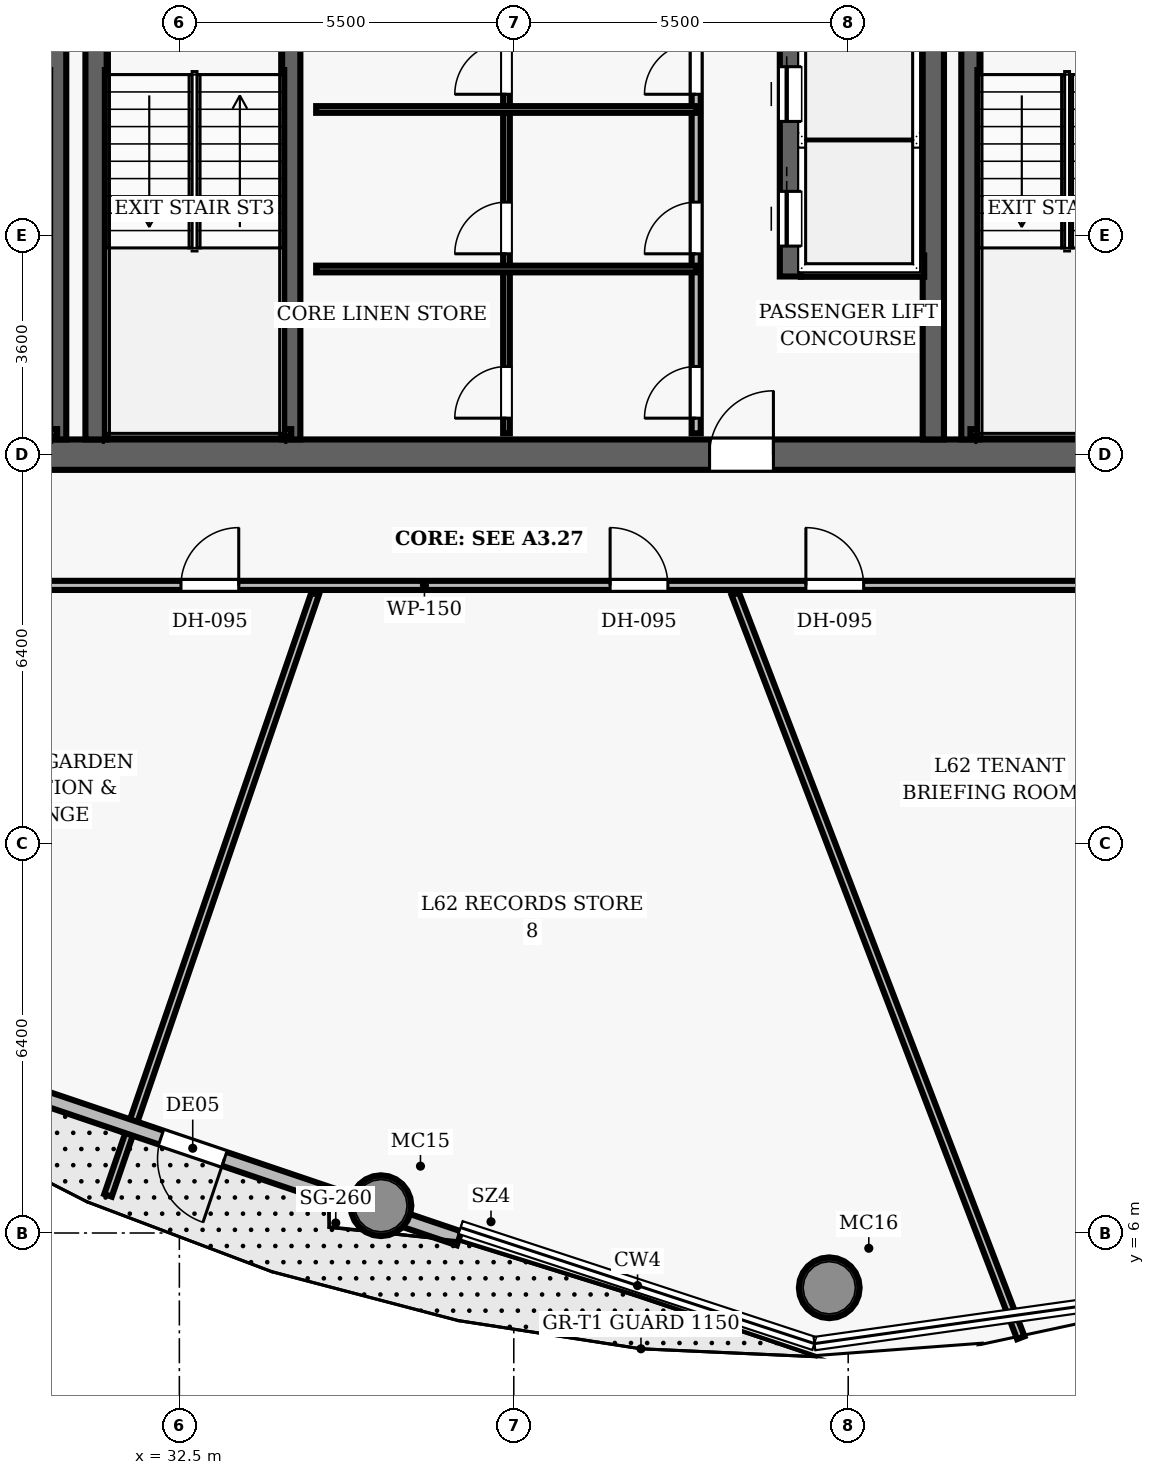
"""IFC4 building model, lengths in metres.
Left out: names, types, materials, properties, quantities, classifications, styles, units other than length and angle.
Written with IfcOpenShell. Run it as: python <this file> out.ifc"""

import sys

from ifc_helpers import new_model, si_unit, direction, frame, frame_2d, origin, origin_2d, place, context, subcontext, project, spatial, rectangle, hollow_circle, extrude, element, fill, save


model = new_model("IFC4")
c1 = context("Model", 3, precision=1e-05, world=origin(), true_north=direction((0.0, 1.0)))
c2 = subcontext(c1, "Body", "Model", "MODEL_VIEW")
j1 = project(units=[si_unit("LENGTHUNIT", "METRE"), si_unit("PLANEANGLEUNIT", "RADIAN")], contexts=[c1])
p1 = place(None, origin())
s1 = spatial("IfcSite", under=j1, at=p1, CompositionType="ELEMENT")
p2 = place(p1, origin())
s2 = spatial("IfcBuilding", under=s1, at=p2, CompositionType="ELEMENT")
p3 = place(p2, frame((0.0, 0.0, 245.9)))
s3 = spatial("IfcBuildingStorey", under=s2, at=p3, CompositionType="ELEMENT", Elevation=245.9)
p4 = place(p3, frame((26.75, 18.8, 0.0), z_axis=(0.0, 0.0, 1.0), x_axis=(1.0, 0.0, 0.0)))
e1 = element("IfcWall", 1, at=p4, inside=s3, PredefinedType="SHEAR", context=c2, shape_type="SweptSolid", body=[
    extrude(rectangle(XDim=22.5, YDim=0.5, at=frame_2d((11.25, 0.0))), origin(), (0.0, 0.0, 1.0), 3.85),
])
p5 = place(p4, frame((14.47, 0.0, 0.0)))
e2 = element("IfcOpeningElement", 2, at=p5, cuts=e1, PredefinedType="OPENING", context=c2, shape_type="SweptSolid", body=[
    extrude(rectangle(XDim=1.05, YDim=2.15, at=frame_2d((0.525, 1.075))), frame((0.0, 0.26, 0.0), z_axis=(0.0, -1.0, 0.0), x_axis=(1.0, 0.0, 0.0)), (0.0, 0.0, 1.0), 0.52),
])
for number, where, z_axis, x_axis in (
    (3, (31.13, 19.05, 0.0), (0.0, 0.0, 1.0), (0.0, 1.0, 0.0)),
    (4, (44.9, 19.05, 0.0), (0.0, 0.0, 1.0), (0.0, 1.0, 0.0)),
):
    element("IfcWall", number, at=place(p3, frame(where, z_axis=z_axis, x_axis=x_axis)), inside=s3, PredefinedType="SHEAR", context=c2, shape_type="SweptSolid", body=[
        extrude(rectangle(XDim=13.9, YDim=0.35, at=frame_2d((6.95, 0.0))), origin(), (0.0, 0.0, 1.0), 3.85),
    ])
for number, where, z_axis, x_axis in (
    (5, (35.815, 6.449, 0.0), (0.0, 0.0, 1.0), (1.0, 0.0, 0.0)),
    (6, (43.188, 5.099, 0.0), (0.0, 0.0, 1.0), (1.0, 0.0, 0.0)),
):
    element("IfcColumn", number, at=place(p3, frame(where, z_axis=z_axis, x_axis=x_axis)), inside=s3, PredefinedType="COLUMN", context=c2, shape_type="SweptSolid", body=[
        extrude(hollow_circle(Radius=0.5, WallThickness=0.045, at=origin_2d()), origin(), (0.0, 0.0, 1.0), 3.85),
    ])
p6 = place(p3, frame((30.49, 19.05, 0.0), z_axis=(0.0, 0.0, 1.0), x_axis=(0.0, 1.0, 0.0)))
e7 = element("IfcWall", 7, at=p6, inside=s3, PredefinedType="SHEAR", context=c2, shape_type="SweptSolid", body=[
    extrude(rectangle(XDim=7.5, YDim=0.3, at=frame_2d((3.75, 0.0))), origin(), (0.0, 0.0, 1.0), 3.85),
])
p7 = place(p3, frame((27.395, 19.16, 0.0), z_axis=(0.0, 0.0, 1.0), x_axis=(1.0, 0.0, 0.0)))
e8 = element("IfcWall", 8, at=p7, inside=s3, PredefinedType="SHEAR", context=c2, shape_type="SweptSolid", body=[
    extrude(rectangle(XDim=3.095, YDim=0.12, at=frame_2d((1.547, 0.0))), origin(), (0.0, 0.0, 1.0), 3.85),
])
p8 = place(p3, frame((45.51, 19.05, 0.0), z_axis=(0.0, 0.0, 1.0), x_axis=(0.0, 1.0, 0.0)))
e9 = element("IfcWall", 9, at=p8, inside=s3, PredefinedType="SHEAR", context=c2, shape_type="SweptSolid", body=[
    extrude(rectangle(XDim=7.5, YDim=0.3, at=frame_2d((3.75, 0.0))), origin(), (0.0, 0.0, 1.0), 3.85),
])
p9 = place(p3, frame((45.51, 19.16, 0.0), z_axis=(0.0, 0.0, 1.0), x_axis=(1.0, 0.0, 0.0)))
e10 = element("IfcWall", 10, at=p9, inside=s3, PredefinedType="SHEAR", context=c2, shape_type="SweptSolid", body=[
    extrude(rectangle(XDim=3.095, YDim=0.12, at=frame_2d((1.547, 0.0))), origin(), (0.0, 0.0, 1.0), 3.85),
])
p10 = place(p3, frame((34.34, 19.05, 0.0), z_axis=(0.0, 0.0, 1.0), x_axis=(0.0, 1.0, 0.0)))
e11 = element("IfcWall", 11, at=p10, inside=s3, PredefinedType="SHEAR", context=c2, shape_type="SweptSolid", body=[
    extrude(rectangle(XDim=7.5, YDim=0.3, at=frame_2d((3.75, 0.0))), origin(), (0.0, 0.0, 1.0), 3.85),
])
p11 = place(p3, frame((31.3, 19.16, 0.0), z_axis=(0.0, 0.0, 1.0), x_axis=(1.0, 0.0, 0.0)))
e12 = element("IfcWall", 12, at=p11, inside=s3, PredefinedType="SHEAR", context=c2, shape_type="SweptSolid", body=[
    extrude(rectangle(XDim=3.04, YDim=0.12, at=frame_2d((1.52, 0.0))), origin(), (0.0, 0.0, 1.0), 3.85),
])
p12 = place(p3, frame((42.55, 21.73, 0.0), z_axis=(0.0, 0.0, 1.0), x_axis=(0.0, 1.0, 0.0)))
e13 = element("IfcWall", 13, at=p12, inside=s3, PredefinedType="SHEAR", context=c2, shape_type="SweptSolid", body=[
    extrude(rectangle(XDim=6.54, YDim=0.35, at=frame_2d((3.27, 0.0))), origin(), (0.0, 0.0, 1.0), 3.04),
])
p13 = place(p12, frame((0.5, 0.0, 0.0)))
e14 = element("IfcOpeningElement", 14, at=p13, cuts=e13, PredefinedType="OPENING", context=c2, shape_type="SweptSolid", body=[
    extrude(rectangle(XDim=0.9, YDim=2.15, at=frame_2d((0.45, 1.075))), frame((0.0, 0.185, 0.0), z_axis=(0.0, -1.0, 0.0), x_axis=(1.0, 0.0, 0.0)), (0.0, 0.0, 1.0), 0.37),
])
p14 = place(p12, frame((2.55, 0.0, 0.0)))
e15 = element("IfcOpeningElement", 15, at=p14, cuts=e13, PredefinedType="OPENING", context=c2, shape_type="SweptSolid", body=[
    extrude(rectangle(XDim=0.9, YDim=2.15, at=frame_2d((0.45, 1.075))), frame((0.0, 0.185, 0.0), z_axis=(0.0, -1.0, 0.0), x_axis=(1.0, 0.0, 0.0)), (0.0, 0.0, 1.0), 0.37),
])
p15 = place(p12, frame((4.6, 0.0, 0.0)))
e16 = element("IfcOpeningElement", 16, at=p15, cuts=e13, PredefinedType="OPENING", context=c2, shape_type="SweptSolid", body=[
    extrude(rectangle(XDim=0.9, YDim=2.15, at=frame_2d((0.45, 1.075))), frame((0.0, 0.185, 0.0), z_axis=(0.0, -1.0, 0.0), x_axis=(1.0, 0.0, 0.0)), (0.0, 0.0, 1.0), 0.37),
])
p16 = place(p3, frame((42.72, 21.9, 0.0), z_axis=(0.0, 0.0, 1.0), x_axis=(1.0, 0.0, 0.0)))
e17 = element("IfcWall", 17, at=p16, inside=s3, PredefinedType="SHEAR", context=c2, shape_type="SweptSolid", body=[
    extrude(rectangle(XDim=2.03, YDim=0.35, at=frame_2d((1.015, 0.0))), origin(), (0.0, 0.0, 1.0), 3.04),
])
p17 = place(p3, frame((41.0, 19.15, 0.0), z_axis=(0.0, 0.0, 1.0), x_axis=(0.0, 1.0, 0.0)))
e18 = element("IfcWall", 18, at=p17, inside=s3, PredefinedType="PARTITIONING", context=c2, shape_type="SweptSolid", body=[
    extrude(rectangle(XDim=7.95, YDim=0.15, at=frame_2d((3.975, 0.0))), origin(), (0.0, 0.0, 1.0), 3.04),
])
p18 = place(p17, frame((0.25, 0.0, 0.0)))
e19 = element("IfcOpeningElement", 19, at=p18, cuts=e18, PredefinedType="OPENING", context=c2, shape_type="SweptSolid", body=[
    extrude(rectangle(XDim=0.85, YDim=2.1, at=frame_2d((0.425, 1.05))), frame((0.0, 0.085, 0.0), z_axis=(0.0, -1.0, 0.0), x_axis=(1.0, 0.0, 0.0)), (0.0, 0.0, 1.0), 0.17),
])
p19 = place(p17, frame((2.953, 0.0, 0.0)))
e20 = element("IfcOpeningElement", 20, at=p19, cuts=e18, PredefinedType="OPENING", context=c2, shape_type="SweptSolid", body=[
    extrude(rectangle(XDim=0.85, YDim=2.1, at=frame_2d((0.425, 1.05))), frame((0.0, 0.085, 0.0), z_axis=(0.0, -1.0, 0.0), x_axis=(1.0, 0.0, 0.0)), (0.0, 0.0, 1.0), 0.17),
])
p20 = place(p17, frame((5.576, 0.0, 0.0)))
e21 = element("IfcOpeningElement", 21, at=p20, cuts=e18, PredefinedType="OPENING", context=c2, shape_type="SweptSolid", body=[
    extrude(rectangle(XDim=0.85, YDim=2.1, at=frame_2d((0.425, 1.05))), frame((0.0, 0.085, 0.0), z_axis=(0.0, -1.0, 0.0), x_axis=(1.0, 0.0, 0.0)), (0.0, 0.0, 1.0), 0.17),
])
p21 = place(p3, frame((37.88, 19.15, 0.0), z_axis=(0.0, 0.0, 1.0), x_axis=(0.0, 1.0, 0.0)))
e22 = element("IfcWall", 22, at=p21, inside=s3, PredefinedType="PARTITIONING", context=c2, shape_type="SweptSolid", body=[
    extrude(rectangle(XDim=7.95, YDim=0.11, at=frame_2d((3.975, 0.0))), origin(), (0.0, 0.0, 1.0), 3.04),
])
p22 = place(p21, frame((0.25, 0.0, 0.0)))
e23 = element("IfcOpeningElement", 23, at=p22, cuts=e22, PredefinedType="OPENING", context=c2, shape_type="SweptSolid", body=[
    extrude(rectangle(XDim=0.85, YDim=2.1, at=frame_2d((0.425, 1.05))), frame((0.0, 0.065, 0.0), z_axis=(0.0, -1.0, 0.0), x_axis=(1.0, 0.0, 0.0)), (0.0, 0.0, 1.0), 0.13),
])
p23 = place(p21, frame((2.953, 0.0, 0.0)))
e24 = element("IfcOpeningElement", 24, at=p23, cuts=e22, PredefinedType="OPENING", context=c2, shape_type="SweptSolid", body=[
    extrude(rectangle(XDim=0.85, YDim=2.1, at=frame_2d((0.425, 1.05))), frame((0.0, 0.065, 0.0), z_axis=(0.0, -1.0, 0.0), x_axis=(1.0, 0.0, 0.0)), (0.0, 0.0, 1.0), 0.13),
])
p24 = place(p21, frame((5.576, 0.0, 0.0)))
e25 = element("IfcOpeningElement", 25, at=p24, cuts=e22, PredefinedType="OPENING", context=c2, shape_type="SweptSolid", body=[
    extrude(rectangle(XDim=0.85, YDim=2.1, at=frame_2d((0.425, 1.05))), frame((0.0, 0.065, 0.0), z_axis=(0.0, -1.0, 0.0), x_axis=(1.0, 0.0, 0.0)), (0.0, 0.0, 1.0), 0.13),
])
for number, where, z_axis, x_axis in (
    (26, (34.75, 21.853, 0.0), (0.0, 0.0, 1.0), (1.0, 0.0, 0.0)),
    (27, (34.75, 24.477, 0.0), (0.0, 0.0, 1.0), (1.0, 0.0, 0.0)),
):
    element("IfcWall", number, at=place(p3, frame(where, z_axis=z_axis, x_axis=x_axis)), inside=s3, PredefinedType="PARTITIONING", context=c2, shape_type="SweptSolid", body=[
        extrude(rectangle(XDim=6.25, YDim=0.11, at=frame_2d((3.125, 0.0))), origin(), (0.0, 0.0, 1.0), 3.04),
    ])
p25 = place(p3, frame((26.9, 16.65, 0.0), z_axis=(0.0, 0.0, 1.0), x_axis=(1.0, 0.0, 0.0)))
e28 = element("IfcWall", 28, at=p25, inside=s3, PredefinedType="PARTITIONING", context=c2, shape_type="SweptSolid", body=[
    extrude(rectangle(XDim=22.2, YDim=0.15, at=frame_2d((11.1, 0.0))), origin(), (0.0, 0.0, 1.0), 3.04),
])
p26 = place(p25, frame((5.627, 0.0, 0.0)))
e29 = element("IfcOpeningElement", 29, at=p26, cuts=e28, PredefinedType="OPENING", context=c2, shape_type="SweptSolid", body=[
    extrude(rectangle(XDim=0.95, YDim=2.15, at=frame_2d((0.475, 1.075))), frame((0.0, 0.085, 0.0), z_axis=(0.0, -1.0, 0.0), x_axis=(1.0, 0.0, 0.0)), (0.0, 0.0, 1.0), 0.17),
])
p27 = place(p25, frame((12.684, 0.0, 0.0)))
e30 = element("IfcOpeningElement", 30, at=p27, cuts=e28, PredefinedType="OPENING", context=c2, shape_type="SweptSolid", body=[
    extrude(rectangle(XDim=0.95, YDim=2.15, at=frame_2d((0.475, 1.075))), frame((0.0, 0.085, 0.0), z_axis=(0.0, -1.0, 0.0), x_axis=(1.0, 0.0, 0.0)), (0.0, 0.0, 1.0), 0.17),
])
p28 = place(p25, frame((15.904, 0.0, 0.0)))
e31 = element("IfcOpeningElement", 31, at=p28, cuts=e28, PredefinedType="OPENING", context=c2, shape_type="SweptSolid", body=[
    extrude(rectangle(XDim=0.95, YDim=2.15, at=frame_2d((0.475, 1.075))), frame((0.0, 0.085, 0.0), z_axis=(0.0, -1.0, 0.0), x_axis=(1.0, 0.0, 0.0)), (0.0, 0.0, 1.0), 0.17),
])
p29 = place(p3, frame((34.732, 16.51, 0.0), z_axis=(0.0, 0.0, 1.0), x_axis=(-0.325579978914, -0.945514504029, 0.0)))
e32 = element("IfcWall", 32, at=p29, inside=s3, PredefinedType="PARTITIONING", context=c2, shape_type="SweptSolid", body=[
    extrude(rectangle(XDim=10.461, YDim=0.13, at=frame_2d((5.231, 0.0))), origin(), (0.0, 0.0, 1.0), 3.04),
])
p30 = place(p3, frame((41.643, 16.51, 0.0), z_axis=(0.0, 0.0, 1.0), x_axis=(0.35837217609, -0.933578804068, 0.0)))
e33 = element("IfcWall", 33, at=p30, inside=s3, PredefinedType="PARTITIONING", context=c2, shape_type="SweptSolid", body=[
    extrude(rectangle(XDim=13.103, YDim=0.13, at=frame_2d((6.551, 0.0))), origin(), (0.0, 0.0, 1.0), 3.04),
])
p31 = place(p3, frame((37.101, 5.911, 0.0), z_axis=(0.0, 0.0, 1.0), x_axis=(-0.947242597845, 0.320517489115, 0.0)))
e34 = element("IfcWall", 34, at=p31, inside=s3, PredefinedType="SOLIDWALL", context=c2, shape_type="SweptSolid", body=[
    extrude(rectangle(XDim=12.42, YDim=0.24, at=frame_2d((6.21, 0.0))), origin(), (0.0, 0.0, 1.0), 2.8),
])
p32 = place(p31, frame((4.075, 0.0, 0.0)))
e35 = element("IfcOpeningElement", 35, at=p32, cuts=e34, PredefinedType="OPENING", context=c2, shape_type="SweptSolid", body=[
    extrude(rectangle(XDim=1.1, YDim=2.2, at=frame_2d((0.55, 1.1))), frame((0.0, 0.13, 0.0), z_axis=(0.0, -1.0, 0.0), x_axis=(1.0, 0.0, 0.0)), (0.0, 0.0, 1.0), 0.26),
])
p33 = place(p5, origin())
e36 = element("IfcDoor", 36, at=p33, inside=s3, OperationType="SINGLE_SWING_RIGHT", PredefinedType="DOOR", context=c2, shape_type="SweptSolid", body=[
    extrude(rectangle(XDim=1.05, YDim=2.15, at=frame_2d((0.525, 1.075))), frame((0.0, 0.025, 0.0), z_axis=(0.0, -1.0, 0.0), x_axis=(1.0, 0.0, 0.0)), (0.0, 0.0, 1.0), 0.05),
])
fill(e2, e36)
p34 = place(p18, origin())
e37 = element("IfcDoor", 37, at=p34, inside=s3, OperationType="SINGLE_SWING_LEFT", PredefinedType="DOOR", context=c2, shape_type="SweptSolid", body=[
    extrude(rectangle(XDim=0.85, YDim=2.1, at=frame_2d((0.425, 1.05))), frame((0.0, 0.025, 0.0), z_axis=(0.0, -1.0, 0.0), x_axis=(1.0, 0.0, 0.0)), (0.0, 0.0, 1.0), 0.05),
])
fill(e19, e37)
p35 = place(p22, origin())
e38 = element("IfcDoor", 38, at=p35, inside=s3, OperationType="SINGLE_SWING_LEFT", PredefinedType="DOOR", context=c2, shape_type="SweptSolid", body=[
    extrude(rectangle(XDim=0.85, YDim=2.1, at=frame_2d((0.425, 1.05))), frame((0.0, 0.025, 0.0), z_axis=(0.0, -1.0, 0.0), x_axis=(1.0, 0.0, 0.0)), (0.0, 0.0, 1.0), 0.05),
])
fill(e23, e38)
p36 = place(p19, origin())
e39 = element("IfcDoor", 39, at=p36, inside=s3, OperationType="SINGLE_SWING_LEFT", PredefinedType="DOOR", context=c2, shape_type="SweptSolid", body=[
    extrude(rectangle(XDim=0.85, YDim=2.1, at=frame_2d((0.425, 1.05))), frame((0.0, 0.025, 0.0), z_axis=(0.0, -1.0, 0.0), x_axis=(1.0, 0.0, 0.0)), (0.0, 0.0, 1.0), 0.05),
])
fill(e20, e39)
p37 = place(p23, origin())
e40 = element("IfcDoor", 40, at=p37, inside=s3, OperationType="SINGLE_SWING_LEFT", PredefinedType="DOOR", context=c2, shape_type="SweptSolid", body=[
    extrude(rectangle(XDim=0.85, YDim=2.1, at=frame_2d((0.425, 1.05))), frame((0.0, 0.025, 0.0), z_axis=(0.0, -1.0, 0.0), x_axis=(1.0, 0.0, 0.0)), (0.0, 0.0, 1.0), 0.05),
])
fill(e24, e40)
p38 = place(p20, origin())
e41 = element("IfcDoor", 41, at=p38, inside=s3, OperationType="SINGLE_SWING_LEFT", PredefinedType="DOOR", context=c2, shape_type="SweptSolid", body=[
    extrude(rectangle(XDim=0.85, YDim=2.1, at=frame_2d((0.425, 1.05))), frame((0.0, 0.025, 0.0), z_axis=(0.0, -1.0, 0.0), x_axis=(1.0, 0.0, 0.0)), (0.0, 0.0, 1.0), 0.05),
])
fill(e21, e41)
p39 = place(p24, origin())
e42 = element("IfcDoor", 42, at=p39, inside=s3, OperationType="SINGLE_SWING_LEFT", PredefinedType="DOOR", context=c2, shape_type="SweptSolid", body=[
    extrude(rectangle(XDim=0.85, YDim=2.1, at=frame_2d((0.425, 1.05))), frame((0.0, 0.025, 0.0), z_axis=(0.0, -1.0, 0.0), x_axis=(1.0, 0.0, 0.0)), (0.0, 0.0, 1.0), 0.05),
])
fill(e25, e42)
p40 = place(p26, origin())
e43 = element("IfcDoor", 43, at=p40, inside=s3, OperationType="SINGLE_SWING_RIGHT", PredefinedType="DOOR", context=c2, shape_type="SweptSolid", body=[
    extrude(rectangle(XDim=0.95, YDim=2.15, at=frame_2d((0.475, 1.075))), frame((0.0, 0.025, 0.0), z_axis=(0.0, -1.0, 0.0), x_axis=(1.0, 0.0, 0.0)), (0.0, 0.0, 1.0), 0.05),
])
fill(e29, e43)
p41 = place(p27, origin())
e44 = element("IfcDoor", 44, at=p41, inside=s3, OperationType="SINGLE_SWING_LEFT", PredefinedType="DOOR", context=c2, shape_type="SweptSolid", body=[
    extrude(rectangle(XDim=0.95, YDim=2.15, at=frame_2d((0.475, 1.075))), frame((0.0, 0.025, 0.0), z_axis=(0.0, -1.0, 0.0), x_axis=(1.0, 0.0, 0.0)), (0.0, 0.0, 1.0), 0.05),
])
fill(e30, e44)
p42 = place(p28, origin())
e45 = element("IfcDoor", 45, at=p42, inside=s3, OperationType="SINGLE_SWING_LEFT", PredefinedType="DOOR", context=c2, shape_type="SweptSolid", body=[
    extrude(rectangle(XDim=0.95, YDim=2.15, at=frame_2d((0.475, 1.075))), frame((0.0, 0.025, 0.0), z_axis=(0.0, -1.0, 0.0), x_axis=(1.0, 0.0, 0.0)), (0.0, 0.0, 1.0), 0.05),
])
fill(e31, e45)
p43 = place(p13, origin())
e46 = element("IfcDoor", 46, at=p43, inside=s3, OperationType="SLIDING_TO_LEFT", PredefinedType="DOOR", context=c2, shape_type="SweptSolid", body=[
    extrude(rectangle(XDim=0.9, YDim=2.15, at=frame_2d((0.45, 1.075))), frame((0.0, 0.025, 0.0), z_axis=(0.0, -1.0, 0.0), x_axis=(1.0, 0.0, 0.0)), (0.0, 0.0, 1.0), 0.05),
])
fill(e14, e46)
p44 = place(p14, origin())
e47 = element("IfcDoor", 47, at=p44, inside=s3, OperationType="SLIDING_TO_LEFT", PredefinedType="DOOR", context=c2, shape_type="SweptSolid", body=[
    extrude(rectangle(XDim=0.9, YDim=2.15, at=frame_2d((0.45, 1.075))), frame((0.0, 0.025, 0.0), z_axis=(0.0, -1.0, 0.0), x_axis=(1.0, 0.0, 0.0)), (0.0, 0.0, 1.0), 0.05),
])
fill(e15, e47)
p45 = place(p32, origin())
e48 = element("IfcDoor", 48, at=p45, inside=s3, OperationType="SINGLE_SWING_LEFT", PredefinedType="DOOR", context=c2, shape_type="SweptSolid", body=[
    extrude(rectangle(XDim=1.1, YDim=2.2, at=frame_2d((0.55, 1.1))), frame((0.0, 0.025, 0.0), z_axis=(0.0, -1.0, 0.0), x_axis=(1.0, 0.0, 0.0)), (0.0, 0.0, 1.0), 0.05),
])
fill(e35, e48)
save(model, sys.argv[1])
